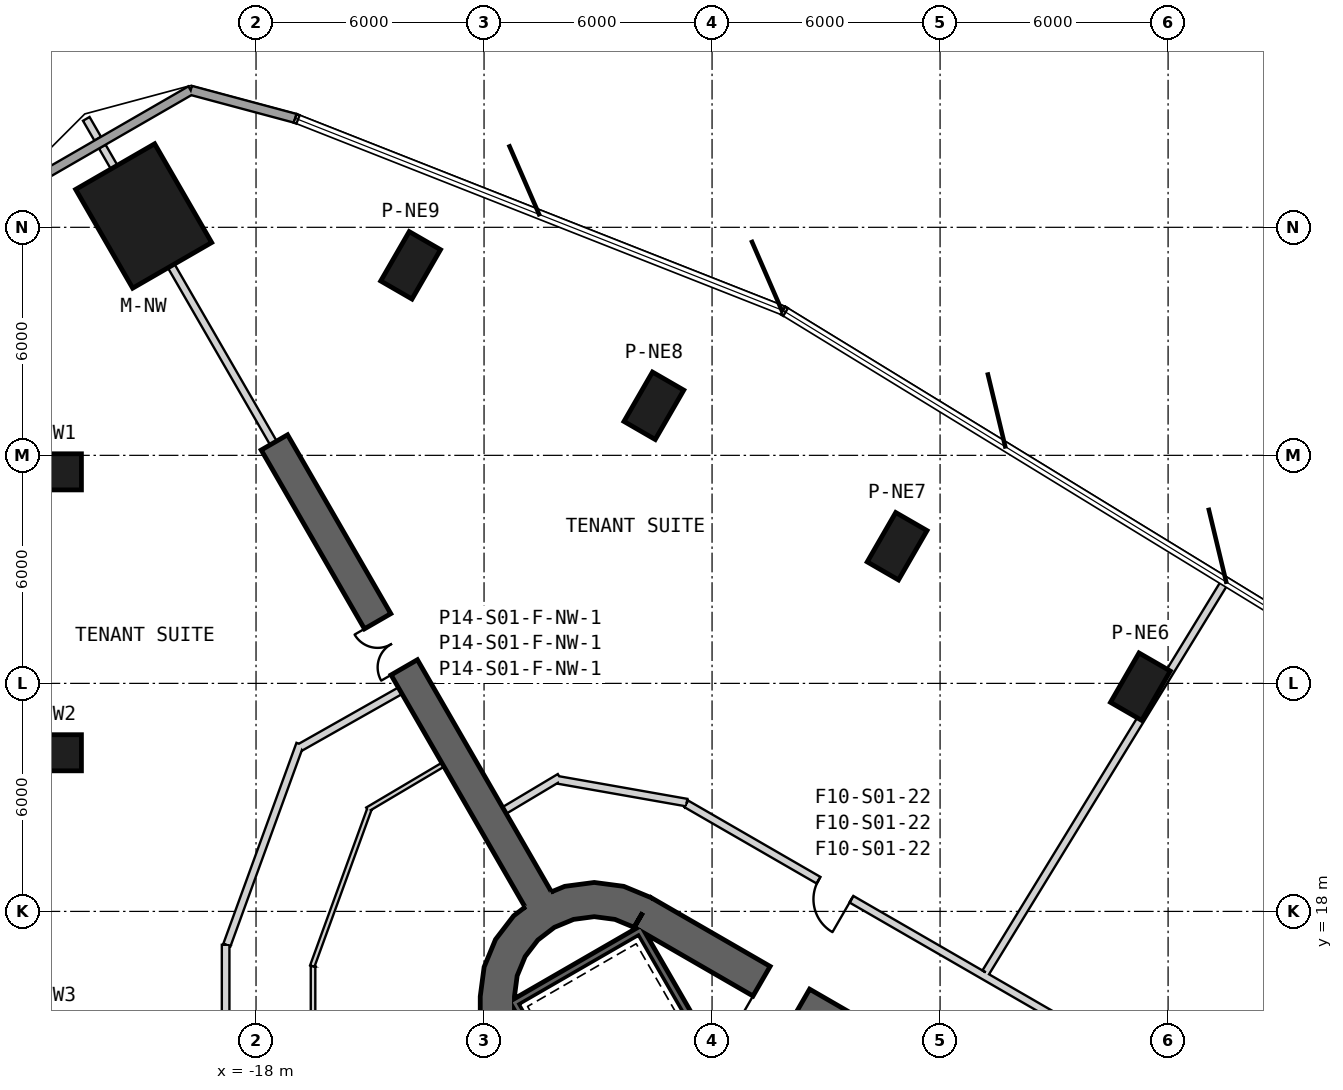
"""IFC4 building model, lengths in metres.
Left out: names, types, materials, properties, quantities, classifications, styles, units other than length and angle.
Written with IfcOpenShell. Run it as: python <this file> out.ifc"""

import sys

from ifc_helpers import new_model, si_unit, direction, frame, frame_2d, origin, origin_2d, place, context, subcontext, project, spatial, polyline, rectangle, outline, extrude, element, fill, save


model = new_model("IFC4")
c1 = context("Model", 3, precision=1e-05, world=origin(), true_north=direction((0.0, 1.0)))
c2 = subcontext(c1, "Body", "Model", "MODEL_VIEW")
j1 = project(units=[si_unit("LENGTHUNIT", "METRE"), si_unit("PLANEANGLEUNIT", "RADIAN")], contexts=[c1])
p1 = place(None, origin())
s1 = spatial("IfcSite", under=j1, at=p1, CompositionType="ELEMENT")
p2 = place(p1, origin())
s2 = spatial("IfcBuilding", under=s1, at=p2, CompositionType="ELEMENT")
p3 = place(p2, frame((0.0, 0.0, 57.8)))
s3 = spatial("IfcBuildingStorey", under=s2, at=p3, CompositionType="ELEMENT", Elevation=57.8)
p4 = place(p3, frame((-20.957, 36.298, 0.0), z_axis=(0.0, 0.0, 1.0), x_axis=(-0.5, 0.866025403784, 0.0)))
e1 = element("IfcColumn", 1, at=p4, inside=s3, PredefinedType="COLUMN", context=c2, shape_type="SweptSolid", body=[
    extrude(rectangle(XDim=3.0, YDim=2.4, at=origin_2d()), origin(), (0.0, 0.0, 1.0), 4.1),
])
for number, where, z_axis, x_axis in (
    (2, (-23.344, 29.566, 0.0), (0.0, 0.0, 1.0), (-1.0, 0.0, 0.0)),
    (3, (-23.344, 22.174, 0.0), (0.0, 0.0, 1.0), (-1.0, 0.0, 0.0)),
    (4, (5.271, 23.913, 0.0), (0.0, 0.0, 1.0), (0.5, 0.866, 0.0)),
    (5, (-1.13, 27.608, 0.0), (0.0, 0.0, 1.0), (0.5, 0.866, 0.0)),
    (6, (-7.531, 31.304, 0.0), (0.0, 0.0, 1.0), (0.5, 0.866, 0.0)),
    (7, (-13.933, 35.0, 0.0), (0.0, 0.0, 1.0), (0.5, 0.866, 0.0)),
):
    element("IfcColumn", number, at=place(p3, frame(where, z_axis=z_axis, x_axis=x_axis)), inside=s3, PredefinedType="COLUMN", context=c2, shape_type="SweptSolid", body=[
        extrude(rectangle(XDim=1.5, YDim=0.95, at=origin_2d()), origin(), (0.0, 0.0, 1.0), 4.1),
    ])
p5 = place(p3, frame((19.475, 2.208, 0.0), z_axis=(0.0, 0.0, 1.0), x_axis=(-0.866028369851, 0.499994862586, 0.0)))
e8 = element("IfcWall", 8, at=p5, inside=s3, PredefinedType="SHEAR", context=c2, shape_type="SweptSolid", body=[
    extrude(rectangle(XDim=31.523, YDim=0.9, at=frame_2d((15.762, 0.0))), origin(), (0.0, 0.0, 1.0), 4.1),
])
p6 = place(p5, frame((7.062, 0.0, 0.0)))
e9 = element("IfcOpeningElement", 9, at=p6, cuts=e8, PredefinedType="OPENING", context=c2, shape_type="SweptSolid", body=[
    extrude(rectangle(XDim=1.2, YDim=2.4, at=frame_2d((0.6, 1.2))), frame((0.0, 0.46, 0.0), z_axis=(0.0, -1.0, 0.0), x_axis=(1.0, 0.0, 0.0)), (0.0, 0.0, 1.0), 0.92),
])
p7 = place(p5, frame((9.762, 0.0, 0.0)))
e10 = element("IfcOpeningElement", 10, at=p7, cuts=e8, PredefinedType="OPENING", context=c2, shape_type="SweptSolid", body=[
    extrude(rectangle(XDim=1.2, YDim=2.4, at=frame_2d((0.6, 1.2))), frame((0.0, 0.46, 0.0), z_axis=(0.0, -1.0, 0.0), x_axis=(1.0, 0.0, 0.0)), (0.0, 0.0, 1.0), 0.92),
])
p8 = place(p5, frame((12.462, 0.0, 0.0)))
e11 = element("IfcOpeningElement", 11, at=p8, cuts=e8, PredefinedType="OPENING", context=c2, shape_type="SweptSolid", body=[
    extrude(rectangle(XDim=1.2, YDim=2.4, at=frame_2d((0.6, 1.2))), frame((0.0, 0.46, 0.0), z_axis=(0.0, -1.0, 0.0), x_axis=(1.0, 0.0, 0.0)), (0.0, 0.0, 1.0), 0.92),
])
p9 = place(p5, frame((15.162, 0.0, 0.0)))
e12 = element("IfcOpeningElement", 12, at=p9, cuts=e8, PredefinedType="OPENING", context=c2, shape_type="SweptSolid", body=[
    extrude(rectangle(XDim=1.2, YDim=2.4, at=frame_2d((0.6, 1.2))), frame((0.0, 0.46, 0.0), z_axis=(0.0, -1.0, 0.0), x_axis=(1.0, 0.0, 0.0)), (0.0, 0.0, 1.0), 0.92),
])
p10 = place(p5, frame((17.862, 0.0, 0.0)))
e13 = element("IfcOpeningElement", 13, at=p10, cuts=e8, PredefinedType="OPENING", context=c2, shape_type="SweptSolid", body=[
    extrude(rectangle(XDim=1.2, YDim=2.4, at=frame_2d((0.6, 1.2))), frame((0.0, 0.46, 0.0), z_axis=(0.0, -1.0, 0.0), x_axis=(1.0, 0.0, 0.0)), (0.0, 0.0, 1.0), 0.92),
])
p11 = place(p5, frame((20.562, 0.0, 0.0)))
e14 = element("IfcOpeningElement", 14, at=p11, cuts=e8, PredefinedType="OPENING", context=c2, shape_type="SweptSolid", body=[
    extrude(rectangle(XDim=1.2, YDim=2.4, at=frame_2d((0.6, 1.2))), frame((0.0, 0.46, 0.0), z_axis=(0.0, -1.0, 0.0), x_axis=(1.0, 0.0, 0.0)), (0.0, 0.0, 1.0), 0.92),
])
p12 = place(p5, frame((23.262, 0.0, 0.0)))
e15 = element("IfcOpeningElement", 15, at=p12, cuts=e8, PredefinedType="OPENING", context=c2, shape_type="SweptSolid", body=[
    extrude(rectangle(XDim=1.2, YDim=2.4, at=frame_2d((0.6, 1.2))), frame((0.0, 0.46, 0.0), z_axis=(0.0, -1.0, 0.0), x_axis=(1.0, 0.0, 0.0)), (0.0, 0.0, 1.0), 0.92),
])
p13 = place(p5, frame((3.612, 0.0, 0.0)))
e16 = element("IfcOpeningElement", 16, at=p13, cuts=e8, PredefinedType="OPENING", context=c2, shape_type="SweptSolid", body=[
    extrude(rectangle(XDim=1.2, YDim=2.4, at=frame_2d((0.6, 1.2))), frame((0.0, 0.46, 0.0), z_axis=(0.0, -1.0, 0.0), x_axis=(1.0, 0.0, 0.0)), (0.0, 0.0, 1.0), 0.92),
])
p14 = place(p5, frame((26.712, 0.0, 0.0)))
e17 = element("IfcOpeningElement", 17, at=p14, cuts=e8, PredefinedType="OPENING", context=c2, shape_type="SweptSolid", body=[
    extrude(rectangle(XDim=1.2, YDim=2.4, at=frame_2d((0.6, 1.2))), frame((0.0, 0.46, 0.0), z_axis=(0.0, -1.0, 0.0), x_axis=(1.0, 0.0, 0.0)), (0.0, 0.0, 1.0), 0.92),
])
p15 = place(p3, frame((-11.65, 15.762, 0.0), z_axis=(0.0, 0.0, 1.0), x_axis=(0.0, -1.0, 0.0)))
e18 = element("IfcWall", 18, at=p15, inside=s3, PredefinedType="SHEAR", context=c2, shape_type="SweptSolid", body=[
    extrude(rectangle(XDim=31.523, YDim=0.9, at=frame_2d((15.762, 0.0))), origin(), (0.0, 0.0, 1.0), 4.1),
])
p16 = place(p15, frame((7.062, 0.0, 0.0)))
e19 = element("IfcOpeningElement", 19, at=p16, cuts=e18, PredefinedType="OPENING", context=c2, shape_type="SweptSolid", body=[
    extrude(rectangle(XDim=1.2, YDim=2.4, at=frame_2d((0.6, 1.2))), frame((0.0, 0.46, 0.0), z_axis=(0.0, -1.0, 0.0), x_axis=(1.0, 0.0, 0.0)), (0.0, 0.0, 1.0), 0.92),
])
p17 = place(p15, frame((9.762, 0.0, 0.0)))
e20 = element("IfcOpeningElement", 20, at=p17, cuts=e18, PredefinedType="OPENING", context=c2, shape_type="SweptSolid", body=[
    extrude(rectangle(XDim=1.2, YDim=2.4, at=frame_2d((0.6, 1.2))), frame((0.0, 0.46, 0.0), z_axis=(0.0, -1.0, 0.0), x_axis=(1.0, 0.0, 0.0)), (0.0, 0.0, 1.0), 0.92),
])
p18 = place(p15, frame((12.462, 0.0, 0.0)))
e21 = element("IfcOpeningElement", 21, at=p18, cuts=e18, PredefinedType="OPENING", context=c2, shape_type="SweptSolid", body=[
    extrude(rectangle(XDim=1.2, YDim=2.4, at=frame_2d((0.6, 1.2))), frame((0.0, 0.46, 0.0), z_axis=(0.0, -1.0, 0.0), x_axis=(1.0, 0.0, 0.0)), (0.0, 0.0, 1.0), 0.92),
])
p19 = place(p15, frame((15.162, 0.0, 0.0)))
e22 = element("IfcOpeningElement", 22, at=p19, cuts=e18, PredefinedType="OPENING", context=c2, shape_type="SweptSolid", body=[
    extrude(rectangle(XDim=1.2, YDim=2.4, at=frame_2d((0.6, 1.2))), frame((0.0, 0.46, 0.0), z_axis=(0.0, -1.0, 0.0), x_axis=(1.0, 0.0, 0.0)), (0.0, 0.0, 1.0), 0.92),
])
p20 = place(p15, frame((17.862, 0.0, 0.0)))
e23 = element("IfcOpeningElement", 23, at=p20, cuts=e18, PredefinedType="OPENING", context=c2, shape_type="SweptSolid", body=[
    extrude(rectangle(XDim=1.2, YDim=2.4, at=frame_2d((0.6, 1.2))), frame((0.0, 0.46, 0.0), z_axis=(0.0, -1.0, 0.0), x_axis=(1.0, 0.0, 0.0)), (0.0, 0.0, 1.0), 0.92),
])
p21 = place(p15, frame((20.562, 0.0, 0.0)))
e24 = element("IfcOpeningElement", 24, at=p21, cuts=e18, PredefinedType="OPENING", context=c2, shape_type="SweptSolid", body=[
    extrude(rectangle(XDim=1.2, YDim=2.4, at=frame_2d((0.6, 1.2))), frame((0.0, 0.46, 0.0), z_axis=(0.0, -1.0, 0.0), x_axis=(1.0, 0.0, 0.0)), (0.0, 0.0, 1.0), 0.92),
])
p22 = place(p15, frame((23.262, 0.0, 0.0)))
e25 = element("IfcOpeningElement", 25, at=p22, cuts=e18, PredefinedType="OPENING", context=c2, shape_type="SweptSolid", body=[
    extrude(rectangle(XDim=1.2, YDim=2.4, at=frame_2d((0.6, 1.2))), frame((0.0, 0.46, 0.0), z_axis=(0.0, -1.0, 0.0), x_axis=(1.0, 0.0, 0.0)), (0.0, 0.0, 1.0), 0.92),
])
p23 = place(p15, frame((3.612, 0.0, 0.0)))
e26 = element("IfcOpeningElement", 26, at=p23, cuts=e18, PredefinedType="OPENING", context=c2, shape_type="SweptSolid", body=[
    extrude(rectangle(XDim=1.2, YDim=2.4, at=frame_2d((0.6, 1.2))), frame((0.0, 0.46, 0.0), z_axis=(0.0, -1.0, 0.0), x_axis=(1.0, 0.0, 0.0)), (0.0, 0.0, 1.0), 0.92),
])
p24 = place(p15, frame((26.712, 0.0, 0.0)))
e27 = element("IfcOpeningElement", 27, at=p24, cuts=e18, PredefinedType="OPENING", context=c2, shape_type="SweptSolid", body=[
    extrude(rectangle(XDim=1.2, YDim=2.4, at=frame_2d((0.6, 1.2))), frame((0.0, 0.46, 0.0), z_axis=(0.0, -1.0, 0.0), x_axis=(1.0, 0.0, 0.0)), (0.0, 0.0, 1.0), 0.92),
])
p25 = place(p3, origin())
e28 = element("IfcWall", 28, at=p25, inside=s3, PredefinedType="SHEAR", context=c2, shape_type="SweptSolid", body=[
    extrude(outline(polyline([(-7.6, 18.36), (-8.323, 18.659), (-9.1, 18.762), (-9.876, 18.659), (-10.6, 18.36), (-11.221, 17.883), (-11.698, 17.262), (-11.998, 16.538), (-12.1, 15.762), (-11.2, 15.762), (-11.128, 16.305), (-10.919, 16.812), (-10.585, 17.247), (-10.15, 17.58), (-9.644, 17.79), (-9.1, 17.862), (-8.556, 17.79), (-8.05, 17.58), (-7.6, 18.36)])), origin(), (0.0, 0.0, 1.0), 4.1),
])
p26 = place(p3, frame((-10.575, 18.316, 0.0), z_axis=(0.0, 0.0, 1.0), x_axis=(-0.500001010139, 0.866024820579, 0.0)))
e29 = element("IfcWall", 29, at=p26, inside=s3, PredefinedType="SHEAR", context=c2, shape_type="SweptSolid", body=[
    extrude(rectangle(XDim=13.884, YDim=0.8, at=frame_2d((6.942, 0.0))), origin(), (0.0, 0.0, 1.0), 4.1),
])
p27 = place(p26, frame((7.05, 0.0, 0.0)))
e30 = element("IfcOpeningElement", 30, at=p27, cuts=e29, PredefinedType="OPENING", context=c2, shape_type="SweptSolid", body=[
    extrude(rectangle(XDim=1.4, YDim=2.4, at=frame_2d((0.7, 1.2))), frame((0.0, 0.41, 0.0), z_axis=(0.0, -1.0, 0.0), x_axis=(1.0, 0.0, 0.0)), (0.0, 0.0, 1.0), 0.82),
])
p28 = place(p3, frame((-16.969, 38.869, 0.0), z_axis=(0.0, 0.0, 1.0), x_axis=(-0.965929678743, 0.258804667121, 0.0)))
e31 = element("IfcWall", 31, at=p28, inside=s3, PredefinedType="SOLIDWALL", context=c2, shape_type="SweptSolid", body=[
    extrude(rectangle(XDim=2.847, YDim=0.24, at=frame_2d((1.423, 0.0))), origin(), (0.0, 0.0, 1.0), 3.8),
])
p29 = place(p3, frame((-19.719, 39.606, 0.0), z_axis=(0.0, 0.0, 1.0), x_axis=(-0.866029712004, -0.499992537871, 0.0)))
e32 = element("IfcWall", 32, at=p29, inside=s3, PredefinedType="SOLIDWALL", context=c2, shape_type="SweptSolid", body=[
    extrude(rectangle(XDim=5.451, YDim=0.24, at=frame_2d((2.726, 0.0))), origin(), (0.0, 0.0, 1.0), 3.8),
])
p30 = place(p3, frame((-11.245, 15.678, -0.3), z_axis=(0.0, 0.0, 1.0), x_axis=(0.499977274689, -0.866038523851, 0.0)))
e33 = element("IfcWall", 33, at=p30, inside=s3, PredefinedType="SHEAR", context=c2, shape_type="SweptSolid", body=[
    extrude(rectangle(XDim=8.1, YDim=0.2, at=frame_2d((4.05, 0.0))), origin(), (0.0, 0.0, 1.0), 4.1),
])
p31 = place(p3, frame((-7.818, 17.541, -0.3), z_axis=(0.0, 0.0, 1.0), x_axis=(-0.866044365799, -0.499967155389, 0.0)))
e34 = element("IfcWall", 34, at=p31, inside=s3, PredefinedType="SHEAR", context=c2, shape_type="SweptSolid", body=[
    extrude(rectangle(XDim=3.8, YDim=0.2, at=frame_2d((1.9, 0.0))), origin(), (0.0, 0.0, 1.0), 4.1),
])
p32 = place(p3, frame((-7.854, 17.405, -0.3), z_axis=(0.0, 0.0, 1.0), x_axis=(0.499997992926, -0.866026562566, 0.0)))
e35 = element("IfcWall", 35, at=p32, inside=s3, PredefinedType="SHEAR", context=c2, shape_type="SweptSolid", body=[
    extrude(rectangle(XDim=7.9, YDim=0.2, at=frame_2d((3.95, 0.0))), origin(), (0.0, 0.0, 1.0), 4.1),
])
p33 = place(p3, frame((-13.082, 21.859, 0.0), z_axis=(0.0, 0.0, 1.0), x_axis=(-0.860286384661, -0.509811079095, 0.0)))
e36 = element("IfcWall", 36, at=p33, inside=s3, PredefinedType="PARTITIONING", context=c2, shape_type="SweptSolid", body=[
    extrude(rectangle(XDim=2.311, YDim=0.12, at=frame_2d((1.155, 0.0))), origin(), (0.0, 0.0, 1.0), 3.8),
])
p34 = place(p3, frame((-15.017, 20.692, 0.0), z_axis=(0.0, 0.0, 1.0), x_axis=(-0.342028368186, -0.939689627141, 0.0)))
e37 = element("IfcWall", 37, at=p34, inside=s3, PredefinedType="PARTITIONING", context=c2, shape_type="SweptSolid", body=[
    extrude(rectangle(XDim=4.397, YDim=0.12, at=frame_2d((2.198, 0.0))), origin(), (0.0, 0.0, 1.0), 2.88),
])
p35 = place(p3, frame((-16.5, 16.557, 0.0), z_axis=(0.0, 0.0, 1.0), x_axis=(0.0, -1.0, 0.0)))
e38 = element("IfcWall", 38, at=p35, inside=s3, PredefinedType="PARTITIONING", context=c2, shape_type="SweptSolid", body=[
    extrude(rectangle(XDim=33.234, YDim=0.12, at=frame_2d((16.617, 0.0))), origin(), (0.0, 0.0, 1.0), 2.98),
])
p36 = place(p35, frame((16.087, 0.0, 0.0)))
e39 = element("IfcOpeningElement", 39, at=p36, cuts=e38, PredefinedType="OPENING", context=c2, shape_type="SweptSolid", body=[
    extrude(rectangle(XDim=1.0, YDim=2.1, at=frame_2d((0.5, 1.05))), frame((0.0, 0.07, 0.0), z_axis=(0.0, -1.0, 0.0), x_axis=(1.0, 0.0, 0.0)), (0.0, 0.0, 1.0), 0.14),
])
p37 = place(p3, frame((-18.8, 17.122, 0.0), z_axis=(0.0, 0.0, 1.0), x_axis=(0.0, -1.0, 0.0)))
e40 = element("IfcWall", 40, at=p37, inside=s3, PredefinedType="PARTITIONING", context=c2, shape_type="SweptSolid", body=[
    extrude(rectangle(XDim=27.252, YDim=0.2, at=frame_2d((13.626, 0.0))), origin(), (0.0, 0.0, 1.0), 3.08),
])
p38 = place(p37, frame((21.804, 0.0, 0.0)))
e41 = element("IfcOpeningElement", 41, at=p38, cuts=e40, PredefinedType="OPENING", context=c2, shape_type="SweptSolid", body=[
    extrude(rectangle(XDim=1.0, YDim=2.1, at=frame_2d((0.5, 1.05))), frame((0.0, 0.11, 0.0), z_axis=(0.0, -1.0, 0.0), x_axis=(1.0, 0.0, 0.0)), (0.0, 0.0, 1.0), 0.22),
])
p39 = place(p37, frame((8.228, 0.0, 0.0)))
e42 = element("IfcOpeningElement", 42, at=p39, cuts=e40, PredefinedType="OPENING", context=c2, shape_type="SweptSolid", body=[
    extrude(rectangle(XDim=1.0, YDim=2.1, at=frame_2d((0.5, 1.05))), frame((0.0, 0.11, 0.0), z_axis=(0.0, -1.0, 0.0), x_axis=(1.0, 0.0, 0.0)), (0.0, 0.0, 1.0), 0.22),
])
p40 = place(p3, frame((-16.842, 22.402, 0.0), z_axis=(0.0, 0.0, 1.0), x_axis=(-0.342049747763, -0.939681845124, 0.0)))
e43 = element("IfcWall", 43, at=p40, inside=s3, PredefinedType="PARTITIONING", context=c2, shape_type="SweptSolid", body=[
    extrude(rectangle(XDim=5.625, YDim=0.2, at=frame_2d((2.812, 0.0))), origin(), (0.0, 0.0, 1.0), 2.88),
])
p41 = place(p3, frame((-14.206, 23.806, 0.0), z_axis=(0.0, 0.0, 1.0), x_axis=(-0.87028621909, -0.492546339811, 0.0)))
e44 = element("IfcWall", 44, at=p41, inside=s3, PredefinedType="PARTITIONING", context=c2, shape_type="SweptSolid", body=[
    extrude(rectangle(XDim=3.026, YDim=0.2, at=frame_2d((1.513, 0.0))), origin(), (0.0, 0.0, 1.0), 3.8),
])
p42 = place(p3, frame((-10.007, 21.529, 0.0), z_axis=(0.0, 0.0, 1.0), x_axis=(-0.858379714818, -0.513014878136, 0.0)))
e45 = element("IfcWall", 45, at=p42, inside=s3, PredefinedType="PARTITIONING", context=c2, shape_type="SweptSolid", body=[
    extrude(rectangle(XDim=1.698, YDim=0.2, at=frame_2d((0.849, 0.0))), origin(), (0.0, 0.0, 1.0), 3.8),
])
p43 = place(p3, frame((-6.667, 20.863, 0.0), z_axis=(0.0, 0.0, 1.0), x_axis=(-0.984817805596, 0.173591156977, 0.0)))
e46 = element("IfcWall", 46, at=p43, inside=s3, PredefinedType="PARTITIONING", context=c2, shape_type="SweptSolid", body=[
    extrude(rectangle(XDim=3.443, YDim=0.2, at=frame_2d((1.721, 0.0))), origin(), (0.0, 0.0, 1.0), 2.88),
])
p44 = place(p3, frame((21.552, 4.531, 0.0), z_axis=(0.0, 0.0, 1.0), x_axis=(-0.866023703603, 0.500002944789, 0.0)))
e47 = element("IfcWall", 47, at=p44, inside=s3, PredefinedType="PARTITIONING", context=c2, shape_type="SweptSolid", body=[
    extrude(rectangle(XDim=32.599, YDim=0.2, at=frame_2d((16.299, 0.0))), origin(), (0.0, 0.0, 1.0), 2.98),
])
p45 = place(p44, frame((27.579, 0.0, 0.0)))
e48 = element("IfcOpeningElement", 48, at=p45, cuts=e47, PredefinedType="OPENING", context=c2, shape_type="SweptSolid", body=[
    extrude(rectangle(XDim=1.0, YDim=2.1, at=frame_2d((0.5, 1.05))), frame((0.0, 0.11, 0.0), z_axis=(0.0, -1.0, 0.0), x_axis=(1.0, 0.0, 0.0)), (0.0, 0.0, 1.0), 0.22),
])
p46 = place(p44, frame((11.33, 0.0, 0.0)))
e49 = element("IfcOpeningElement", 49, at=p46, cuts=e47, PredefinedType="OPENING", context=c2, shape_type="SweptSolid", body=[
    extrude(rectangle(XDim=1.0, YDim=2.1, at=frame_2d((0.5, 1.05))), frame((0.0, 0.11, 0.0), z_axis=(0.0, -1.0, 0.0), x_axis=(1.0, 0.0, 0.0)), (0.0, 0.0, 1.0), 0.22),
])
p47 = place(p3, frame((-22.467, 38.854, 0.0), z_axis=(0.0, 0.0, 1.0), x_axis=(0.499757541684, -0.866165341912, 0.0)))
e50 = element("IfcWall", 50, at=p47, inside=s3, PredefinedType="PARTITIONING", context=c2, shape_type="SweptSolid", body=[
    extrude(rectangle(XDim=0.602, YDim=0.2, at=frame_2d((0.301, 0.0))), origin(), (0.0, 0.0, 1.0), 3.8),
])
p48 = place(p3, frame((-22.045, 38.124, 0.0), z_axis=(0.0, 0.0, 1.0), x_axis=(0.49966612908, -0.86621807846, 0.0)))
e51 = element("IfcWall", 51, at=p48, inside=s3, PredefinedType="PARTITIONING", context=c2, shape_type="SweptSolid", body=[
    extrude(rectangle(XDim=0.625, YDim=0.2, at=frame_2d((0.313, 0.0))), origin(), (0.0, 0.0, 1.0), 3.8),
])
p49 = place(p3, frame((-20.233, 34.984, 0.0), z_axis=(0.0, 0.0, 1.0), x_axis=(0.500014458952, -0.866017055744, 0.0)))
e52 = element("IfcWall", 52, at=p49, inside=s3, PredefinedType="PARTITIONING", context=c2, shape_type="SweptSolid", body=[
    extrude(rectangle(XDim=5.38, YDim=0.2, at=frame_2d((2.69, 0.0))), origin(), (0.0, 0.0, 1.0), 3.37),
])
p50 = place(p3, frame((7.503, 26.685, 0.0), z_axis=(0.0, 0.0, 1.0), x_axis=(-0.522270694587, -0.852779761472, 0.0)))
e53 = element("IfcWall", 53, at=p50, inside=s3, PredefinedType="PARTITIONING", context=c2, shape_type="SweptSolid", body=[
    extrude(rectangle(XDim=12.066, YDim=0.2, at=frame_2d((6.033, 0.0))), origin(), (0.0, 0.0, 1.0), 3.08),
])
p51 = place(p45, origin())
e54 = element("IfcDoor", 54, at=p51, inside=s3, OperationType="SINGLE_SWING_LEFT", PredefinedType="USERDEFINED", context=c2, shape_type="SweptSolid", body=[
    extrude(rectangle(XDim=1.0, YDim=2.1, at=frame_2d((0.5, 1.05))), frame((0.0, 0.025, 0.0), z_axis=(0.0, -1.0, 0.0), x_axis=(1.0, 0.0, 0.0)), (0.0, 0.0, 1.0), 0.05),
])
fill(e48, e54)
p52 = place(p14, origin())
e55 = element("IfcDoor", 55, at=p52, inside=s3, OperationType="SINGLE_SWING_LEFT", PredefinedType="USERDEFINED", context=c2, shape_type="SweptSolid", body=[
    extrude(rectangle(XDim=1.2, YDim=2.4, at=frame_2d((0.6, 1.2))), frame((0.0, 0.025, 0.0), z_axis=(0.0, -1.0, 0.0), x_axis=(1.0, 0.0, 0.0)), (0.0, 0.0, 1.0), 0.05),
])
fill(e17, e55)
p53 = place(p27, origin())
e56 = element("IfcDoor", 56, at=p53, inside=s3, OperationType="DOUBLE_DOOR_SINGLE_SWING", PredefinedType="NOTDEFINED", context=c2, shape_type="SweptSolid", body=[
    extrude(rectangle(XDim=1.4, YDim=2.4, at=frame_2d((0.7, 1.2))), frame((0.0, 0.025, 0.0), z_axis=(0.0, -1.0, 0.0), x_axis=(1.0, 0.0, 0.0)), (0.0, 0.0, 1.0), 0.05),
])
fill(e30, e56)
save(model, sys.argv[1])
